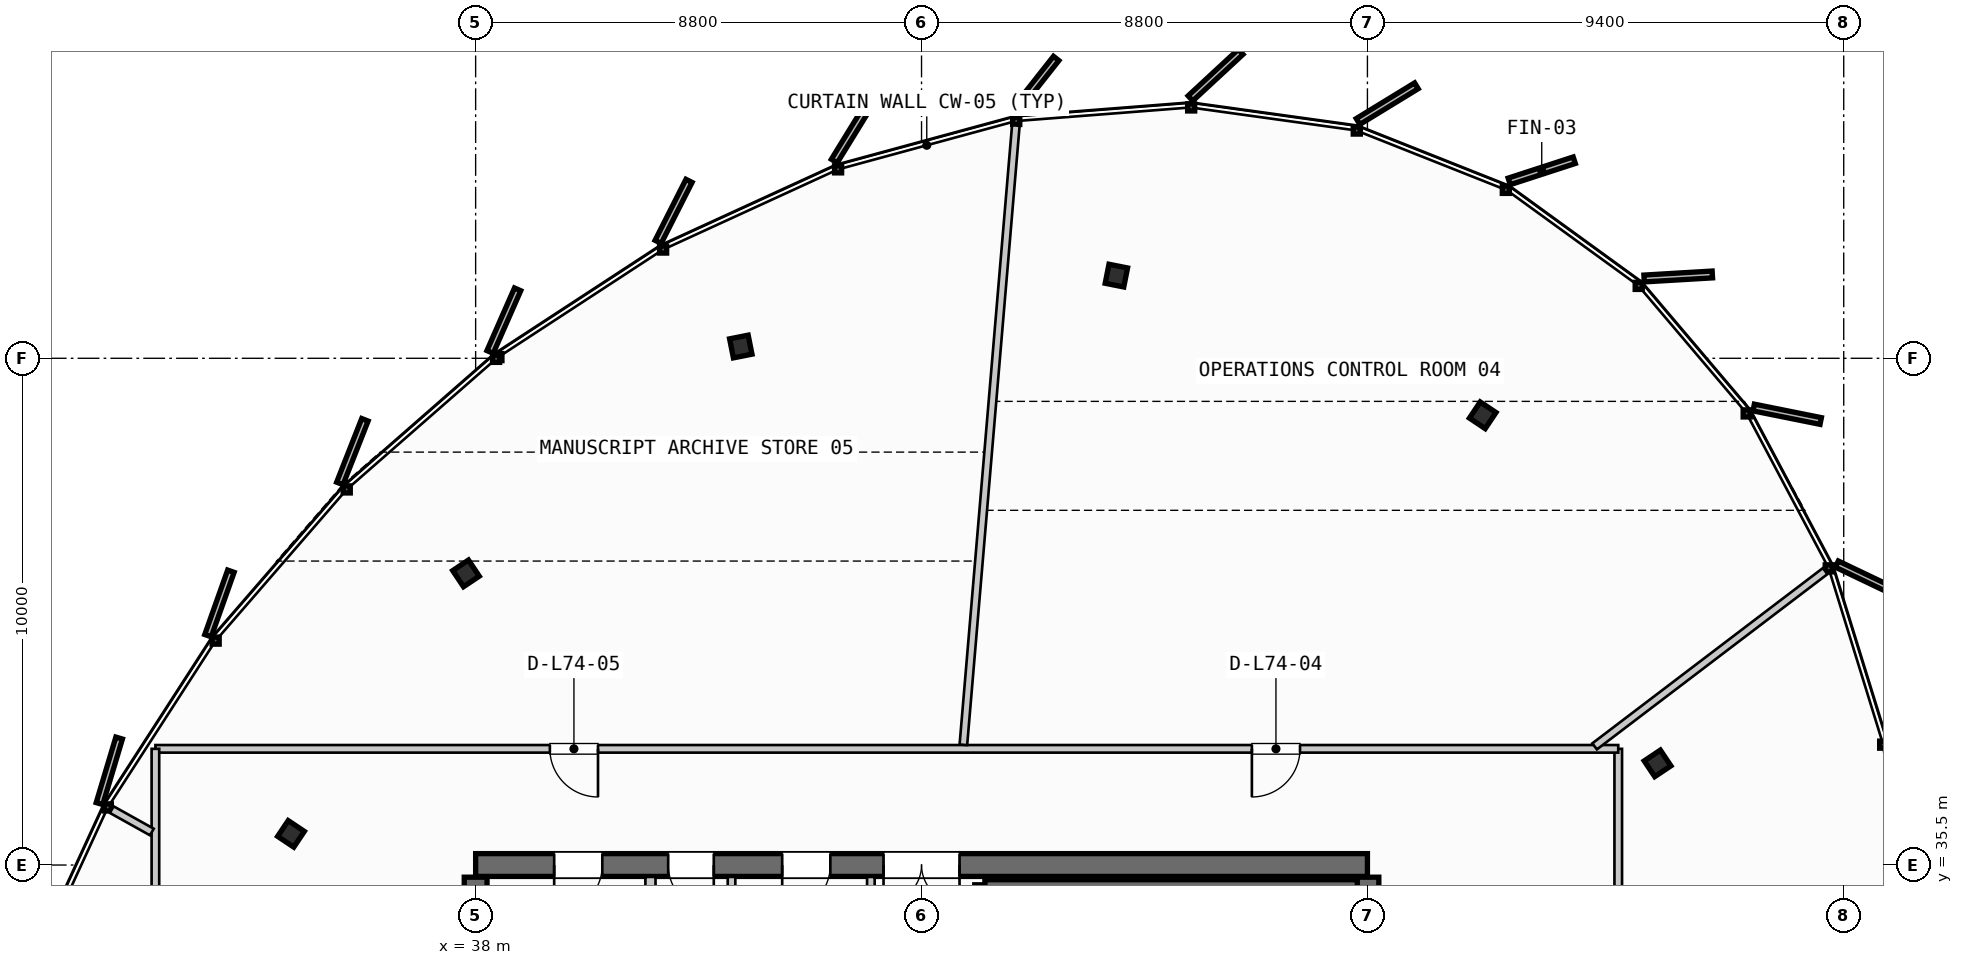
"""IFC4 building model, lengths in metres.
Left out: names, types, materials, properties, quantities, classifications, styles, units other than length and angle.
Written with IfcOpenShell. Run it as: python <this file> out.ifc"""

import sys

from ifc_helpers import new_model, si_unit, direction, frame, frame_2d, origin, origin_2d, place, context, subcontext, project, spatial, rectangle, i_section, extrude, source, transform, mapped, element, fill, save


model = new_model("IFC4")
c1 = context("Model", 3, precision=1e-05, world=origin(), true_north=direction((0.0, 1.0)))
c2 = subcontext(c1, "Body", "Model", "MODEL_VIEW")
j1 = project(units=[si_unit("LENGTHUNIT", "METRE"), si_unit("PLANEANGLEUNIT", "RADIAN")], contexts=[c1])
p1 = place(None, origin())
s1 = spatial("IfcSite", under=j1, at=p1, CompositionType="ELEMENT")
p2 = place(p1, origin())
s2 = spatial("IfcBuilding", under=s1, at=p2, CompositionType="ELEMENT")
p3 = place(p2, frame((0.0, 0.0, 280.15)))
s3 = spatial("IfcBuildingStorey", under=s2, at=p3, CompositionType="ELEMENT", Elevation=280.15)
p4 = place(p3, frame((55.6, 35.5, 0.0), z_axis=(0.0, 0.0, 1.0), x_axis=(-1.0, 0.0, 0.0)))
e1 = element("IfcWall", 1, at=p4, inside=s3, PredefinedType="SHEAR", context=c2, shape_type="SweptSolid", body=[
    extrude(rectangle(XDim=17.6, YDim=0.45, at=frame_2d((8.8, 0.0))), origin(), (0.0, 0.0, 1.0), 3.21),
])
p5 = place(p4, frame((8.05, 0.0, 0.0)))
e2 = element("IfcOpeningElement", 2, at=p5, cuts=e1, PredefinedType="OPENING", context=c2, shape_type="SweptSolid", body=[
    extrude(rectangle(XDim=1.5, YDim=2.2, at=frame_2d((0.75, 1.1))), frame((0.0, 0.235, 0.0), z_axis=(0.0, -1.0, 0.0), x_axis=(1.0, 0.0, 0.0)), (0.0, 0.0, 1.0), 0.47),
])
p6 = place(p4, frame((15.1, 0.0, 0.0)))
e3 = element("IfcOpeningElement", 3, at=p6, cuts=e1, PredefinedType="OPENING", context=c2, shape_type="SweptSolid", body=[
    extrude(rectangle(XDim=0.95, YDim=2.15, at=frame_2d((0.475, 1.075))), frame((0.0, 0.235, 0.0), z_axis=(0.0, -1.0, 0.0), x_axis=(1.0, 0.0, 0.0)), (0.0, 0.0, 1.0), 0.47),
])
p7 = place(p4, frame((12.9, 0.0, 0.0)))
e4 = element("IfcOpeningElement", 4, at=p7, cuts=e1, PredefinedType="OPENING", context=c2, shape_type="SweptSolid", body=[
    extrude(rectangle(XDim=0.9, YDim=2.15, at=frame_2d((0.45, 1.075))), frame((0.0, 0.235, 0.0), z_axis=(0.0, -1.0, 0.0), x_axis=(1.0, 0.0, 0.0)), (0.0, 0.0, 1.0), 0.47),
])
p8 = place(p4, frame((10.6, 0.0, 0.0)))
e5 = element("IfcOpeningElement", 5, at=p8, cuts=e1, PredefinedType="OPENING", context=c2, shape_type="SweptSolid", body=[
    extrude(rectangle(XDim=0.95, YDim=2.15, at=frame_2d((0.475, 1.075))), frame((0.0, 0.235, 0.0), z_axis=(0.0, -1.0, 0.0), x_axis=(1.0, 0.0, 0.0)), (0.0, 0.0, 1.0), 0.47),
])
p9 = place(p3, frame((38.0, 35.26, 0.0), z_axis=(0.0, 0.0, 1.0), x_axis=(0.0, -1.0, 0.0)))
e6 = element("IfcWall", 6, at=p9, inside=s3, PredefinedType="SHEAR", context=c2, shape_type="SweptSolid", body=[
    extrude(rectangle(XDim=14.92, YDim=0.45, at=frame_2d((7.46, 0.0))), origin(), (0.0, 0.0, 1.0), 3.21),
])
p10 = place(p9, frame((5.21, 0.0, 0.0)))
e7 = element("IfcOpeningElement", 7, at=p10, cuts=e6, PredefinedType="OPENING", context=c2, shape_type="SweptSolid", body=[
    extrude(rectangle(XDim=1.1, YDim=2.2, at=frame_2d((0.55, 1.1))), frame((0.0, 0.235, 0.0), z_axis=(0.0, -1.0, 0.0), x_axis=(1.0, 0.0, 0.0)), (0.0, 0.0, 1.0), 0.47),
])
p11 = place(p3, frame((55.6, 20.34, 0.0), z_axis=(0.0, 0.0, 1.0), x_axis=(0.0, 1.0, 0.0)))
e8 = element("IfcWall", 8, at=p11, inside=s3, PredefinedType="SHEAR", context=c2, shape_type="SweptSolid", body=[
    extrude(rectangle(XDim=14.92, YDim=0.45, at=frame_2d((7.46, 0.0))), origin(), (0.0, 0.0, 1.0), 3.21),
])
p12 = place(p11, frame((12.71, 0.0, 0.0)))
e9 = element("IfcOpeningElement", 9, at=p12, cuts=e8, PredefinedType="OPENING", context=c2, shape_type="SweptSolid", body=[
    extrude(rectangle(XDim=1.05, YDim=2.15, at=frame_2d((0.525, 1.075))), frame((0.0, 0.235, 0.0), z_axis=(0.0, -1.0, 0.0), x_axis=(1.0, 0.0, 0.0)), (0.0, 0.0, 1.0), 0.47),
])
p13 = place(p11, frame((8.61, 0.0, 0.0)))
e10 = element("IfcOpeningElement", 10, at=p13, cuts=e8, PredefinedType="OPENING", context=c2, shape_type="SweptSolid", body=[
    extrude(rectangle(XDim=1.1, YDim=2.2, at=frame_2d((0.55, 1.1))), frame((0.0, 0.235, 0.0), z_axis=(0.0, -1.0, 0.0), x_axis=(1.0, 0.0, 0.0)), (0.0, 0.0, 1.0), 0.47),
])
m1 = source(origin(), c2, "Body", "SweptSolid", [
    extrude(i_section(OverallWidth=0.374, OverallDepth=0.383, WebThickness=0.017, FlangeThickness=0.026, FilletRadius=0.015, at=origin_2d()), origin(), (0.0, 0.0, 1.0), 3.21),
])
for number, where, z_axis, x_axis in (
    (11, (61.326, 37.506, 0.0), (0.0, 0.0, 1.0), (0.831, 0.556, 0.0)),
    (12, (57.875, 44.375, 0.0), (0.0, 0.0, 1.0), (0.556, 0.831, 0.0)),
    (13, (50.645, 47.132, 0.0), (0.0, 0.0, 1.0), (0.195, 0.981, 0.0)),
    (14, (43.233, 45.732, 0.0), (0.0, 0.0, 1.0), (-0.195, 0.981, 0.0)),
    (15, (37.81, 41.255, 0.0), (0.0, 0.0, 1.0), (-0.556, 0.831, 0.0)),
    (16, (34.356, 36.115, 0.0), (0.0, 0.0, 1.0), (-0.831, 0.556, 0.0)),
):
    element("IfcColumn", number, at=place(p3, frame(where, z_axis=z_axis, x_axis=x_axis)), inside=s3, PredefinedType="COLUMN", context=c2, shape_type="MappedRepresentation", body=[
        mapped(m1, transform((0.0, 0.0, 0.0), scale=1.0)),
    ])
p14 = place(p3, frame((48.05, 35.11, 0.0), z_axis=(0.0, 0.0, 1.0), x_axis=(1.0, 0.0, 0.0)))
e17 = element("IfcWall", 17, at=p14, inside=s3, PredefinedType="SHEAR", context=c2, shape_type="SweptSolid", body=[
    extrude(rectangle(XDim=7.35, YDim=0.2, at=frame_2d((3.675, 0.0))), origin(), (0.0, 0.0, 1.0), 3.21),
])
p15 = place(p3, frame((41.45, 31.85, 0.0), z_axis=(0.0, 0.0, 1.0), x_axis=(0.0, 1.0, 0.0)))
e18 = element("IfcWall", 18, at=p15, inside=s3, PredefinedType="PARTITIONING", context=c2, shape_type="SweptSolid", body=[
    extrude(rectangle(XDim=3.415, YDim=0.2, at=frame_2d((1.708, 0.0))), origin(), (0.0, 0.0, 1.0), 2.455),
])
p16 = place(p3, frame((45.8, 31.85, 0.0), z_axis=(0.0, 0.0, 1.0), x_axis=(0.0, 1.0, 0.0)))
e19 = element("IfcWall", 19, at=p16, inside=s3, PredefinedType="PARTITIONING", context=c2, shape_type="SweptSolid", body=[
    extrude(rectangle(XDim=3.415, YDim=0.15, at=frame_2d((1.708, 0.0))), origin(), (0.0, 0.0, 1.0), 2.455),
])
p17 = place(p3, frame((43.05, 31.85, 0.0), z_axis=(0.0, 0.0, 1.0), x_axis=(0.0, 1.0, 0.0)))
e20 = element("IfcWall", 20, at=p17, inside=s3, PredefinedType="PLUMBINGWALL", context=c2, shape_type="SweptSolid", body=[
    extrude(rectangle(XDim=3.415, YDim=0.15, at=frame_2d((1.708, 0.0))), origin(), (0.0, 0.0, 1.0), 2.455),
])
p18 = place(p3, frame((60.55, 17.807, 0.0), z_axis=(0.0, 0.0, 1.0), x_axis=(0.0, 1.0, 0.0)))
e21 = element("IfcWall", 21, at=p18, inside=s3, PredefinedType="PARTITIONING", context=c2, shape_type="SweptSolid", body=[
    extrude(rectangle(XDim=19.986, YDim=0.15, at=frame_2d((9.993, 0.0))), origin(), (0.0, 0.0, 1.0), 2.455),
])
p19 = place(p18, frame((4.263, 0.0, 0.0)))
e22 = element("IfcOpeningElement", 22, at=p19, cuts=e21, PredefinedType="OPENING", context=c2, shape_type="SweptSolid", body=[
    extrude(rectangle(XDim=0.95, YDim=2.15, at=frame_2d((0.475, 1.075))), frame((0.0, 0.085, 0.0), z_axis=(0.0, -1.0, 0.0), x_axis=(1.0, 0.0, 0.0)), (0.0, 0.0, 1.0), 0.17),
])
p20 = place(p18, frame((14.076, 0.0, 0.0)))
e23 = element("IfcOpeningElement", 23, at=p20, cuts=e21, PredefinedType="OPENING", context=c2, shape_type="SweptSolid", body=[
    extrude(rectangle(XDim=0.95, YDim=2.15, at=frame_2d((0.475, 1.075))), frame((0.0, 0.085, 0.0), z_axis=(0.0, -1.0, 0.0), x_axis=(1.0, 0.0, 0.0)), (0.0, 0.0, 1.0), 0.17),
])
p21 = place(p3, frame((60.55, 37.793, 0.0), z_axis=(0.0, 0.0, 1.0), x_axis=(-1.0, 0.0, 0.0)))
e24 = element("IfcWall", 24, at=p21, inside=s3, PredefinedType="PARTITIONING", context=c2, shape_type="SweptSolid", body=[
    extrude(rectangle(XDim=28.87, YDim=0.15, at=frame_2d((14.435, 0.0))), origin(), (0.0, 0.0, 1.0), 2.455),
])
p22 = place(p21, frame((6.281, 0.0, 0.0)))
e25 = element("IfcOpeningElement", 25, at=p22, cuts=e24, PredefinedType="OPENING", context=c2, shape_type="SweptSolid", body=[
    extrude(rectangle(XDim=0.95, YDim=2.15, at=frame_2d((0.475, 1.075))), frame((0.0, 0.085, 0.0), z_axis=(0.0, -1.0, 0.0), x_axis=(1.0, 0.0, 0.0)), (0.0, 0.0, 1.0), 0.17),
])
p23 = place(p21, frame((20.135, 0.0, 0.0)))
e26 = element("IfcOpeningElement", 26, at=p23, cuts=e24, PredefinedType="OPENING", context=c2, shape_type="SweptSolid", body=[
    extrude(rectangle(XDim=0.95, YDim=2.15, at=frame_2d((0.475, 1.075))), frame((0.0, 0.085, 0.0), z_axis=(0.0, -1.0, 0.0), x_axis=(1.0, 0.0, 0.0)), (0.0, 0.0, 1.0), 0.17),
])
p24 = place(p3, frame((31.68, 37.793, 0.0), z_axis=(0.0, 0.0, 1.0), x_axis=(0.0, -1.0, 0.0)))
e27 = element("IfcWall", 27, at=p24, inside=s3, PredefinedType="PARTITIONING", context=c2, shape_type="SweptSolid", body=[
    extrude(rectangle(XDim=19.986, YDim=0.15, at=frame_2d((9.993, 0.0))), origin(), (0.0, 0.0, 1.0), 2.455),
])
p25 = place(p24, frame((4.699, 0.0, 0.0)))
e28 = element("IfcOpeningElement", 28, at=p25, cuts=e27, PredefinedType="OPENING", context=c2, shape_type="SweptSolid", body=[
    extrude(rectangle(XDim=0.95, YDim=2.15, at=frame_2d((0.475, 1.075))), frame((0.0, 0.085, 0.0), z_axis=(0.0, -1.0, 0.0), x_axis=(1.0, 0.0, 0.0)), (0.0, 0.0, 1.0), 0.17),
])
p26 = place(p24, frame((14.29, 0.0, 0.0)))
e29 = element("IfcOpeningElement", 29, at=p26, cuts=e27, PredefinedType="OPENING", context=c2, shape_type="SweptSolid", body=[
    extrude(rectangle(XDim=0.95, YDim=2.15, at=frame_2d((0.475, 1.075))), frame((0.0, 0.085, 0.0), z_axis=(0.0, -1.0, 0.0), x_axis=(1.0, 0.0, 0.0)), (0.0, 0.0, 1.0), 0.17),
])
p27 = place(p3, frame((60.084, 37.841, 0.0), z_axis=(0.0, 0.0, 1.0), x_axis=(0.796092215945, 0.605175333033, 0.0)))
e30 = element("IfcWall", 30, at=p27, inside=s3, PredefinedType="PARTITIONING", context=c2, shape_type="SweptSolid", body=[
    extrude(rectangle(XDim=5.715, YDim=0.15, at=frame_2d((2.857, 0.0))), origin(), (0.0, 0.0, 1.0), 2.455),
])
p28 = place(p3, frame((47.626, 37.873, 0.0), z_axis=(0.0, 0.0, 1.0), x_axis=(0.084419293374, 0.996430320146, 0.0)))
e31 = element("IfcWall", 31, at=p28, inside=s3, PredefinedType="PARTITIONING", context=c2, shape_type="SweptSolid", body=[
    extrude(rectangle(XDim=12.265, YDim=0.15, at=frame_2d((6.132, 0.0))), origin(), (0.0, 0.0, 1.0), 2.455),
])
p29 = place(p3, frame((31.61, 36.151, 0.0), z_axis=(0.0, 0.0, 1.0), x_axis=(-0.87313905588, 0.487471218736, 0.0)))
e32 = element("IfcWall", 32, at=p29, inside=s3, PredefinedType="PARTITIONING", context=c2, shape_type="SweptSolid", body=[
    extrude(rectangle(XDim=0.906, YDim=0.15, at=frame_2d((0.453, 0.0))), origin(), (0.0, 0.0, 1.0), 2.455),
])
m2 = source(origin(), c2, "Body", "SweptSolid", [
    extrude(rectangle(XDim=1.5, YDim=2.2, at=frame_2d((0.75, 1.1))), frame((0.0, 0.025, 0.0), z_axis=(0.0, -1.0, 0.0), x_axis=(1.0, 0.0, 0.0)), (0.0, 0.0, 1.0), 0.05),
])
p30 = place(p5, origin())
e33 = element("IfcDoor", 33, at=p30, inside=s3, OperationType="DOUBLE_DOOR_SINGLE_SWING", PredefinedType="DOOR", context=c2, shape_type="MappedRepresentation", body=[
    mapped(m2, transform((0.0, 0.0, 0.0), scale=1.0)),
])
fill(e2, e33)
m3 = source(origin(), c2, "Body", "SweptSolid", [
    extrude(rectangle(XDim=0.95, YDim=2.15, at=frame_2d((0.475, 1.075))), frame((0.0, 0.025, 0.0), z_axis=(0.0, -1.0, 0.0), x_axis=(1.0, 0.0, 0.0)), (0.0, 0.0, 1.0), 0.05),
])
p31 = place(p6, origin())
e34 = element("IfcDoor", 34, at=p31, inside=s3, OperationType="SINGLE_SWING_RIGHT", PredefinedType="DOOR", context=c2, shape_type="MappedRepresentation", body=[
    mapped(m3, transform((0.0, 0.0, 0.0), scale=1.0)),
])
fill(e3, e34)
m4 = source(origin(), c2, "Body", "SweptSolid", [
    extrude(rectangle(XDim=0.9, YDim=2.15, at=frame_2d((0.45, 1.075))), frame((0.0, 0.025, 0.0), z_axis=(0.0, -1.0, 0.0), x_axis=(1.0, 0.0, 0.0)), (0.0, 0.0, 1.0), 0.05),
])
p32 = place(p7, origin())
e35 = element("IfcDoor", 35, at=p32, inside=s3, OperationType="SINGLE_SWING_LEFT", PredefinedType="DOOR", context=c2, shape_type="MappedRepresentation", body=[
    mapped(m4, transform((0.0, 0.0, 0.0), scale=1.0)),
])
fill(e4, e35)
p33 = place(p8, origin())
e36 = element("IfcDoor", 36, at=p33, inside=s3, OperationType="SINGLE_SWING_RIGHT", PredefinedType="DOOR", context=c2, shape_type="MappedRepresentation", body=[
    mapped(m3, transform((0.0, 0.0, 0.0), scale=1.0)),
])
fill(e5, e36)
p34 = place(p22, origin())
e37 = element("IfcDoor", 37, at=p34, inside=s3, OperationType="SINGLE_SWING_RIGHT", PredefinedType="DOOR", context=c2, shape_type="MappedRepresentation", body=[
    mapped(m3, transform((0.0, 0.0, 0.0), scale=1.0)),
])
fill(e25, e37)
p35 = place(p23, origin())
e38 = element("IfcDoor", 38, at=p35, inside=s3, OperationType="SINGLE_SWING_LEFT", PredefinedType="DOOR", context=c2, shape_type="MappedRepresentation", body=[
    mapped(m3, transform((0.0, 0.0, 0.0), scale=1.0)),
])
fill(e26, e38)
save(model, sys.argv[1])
